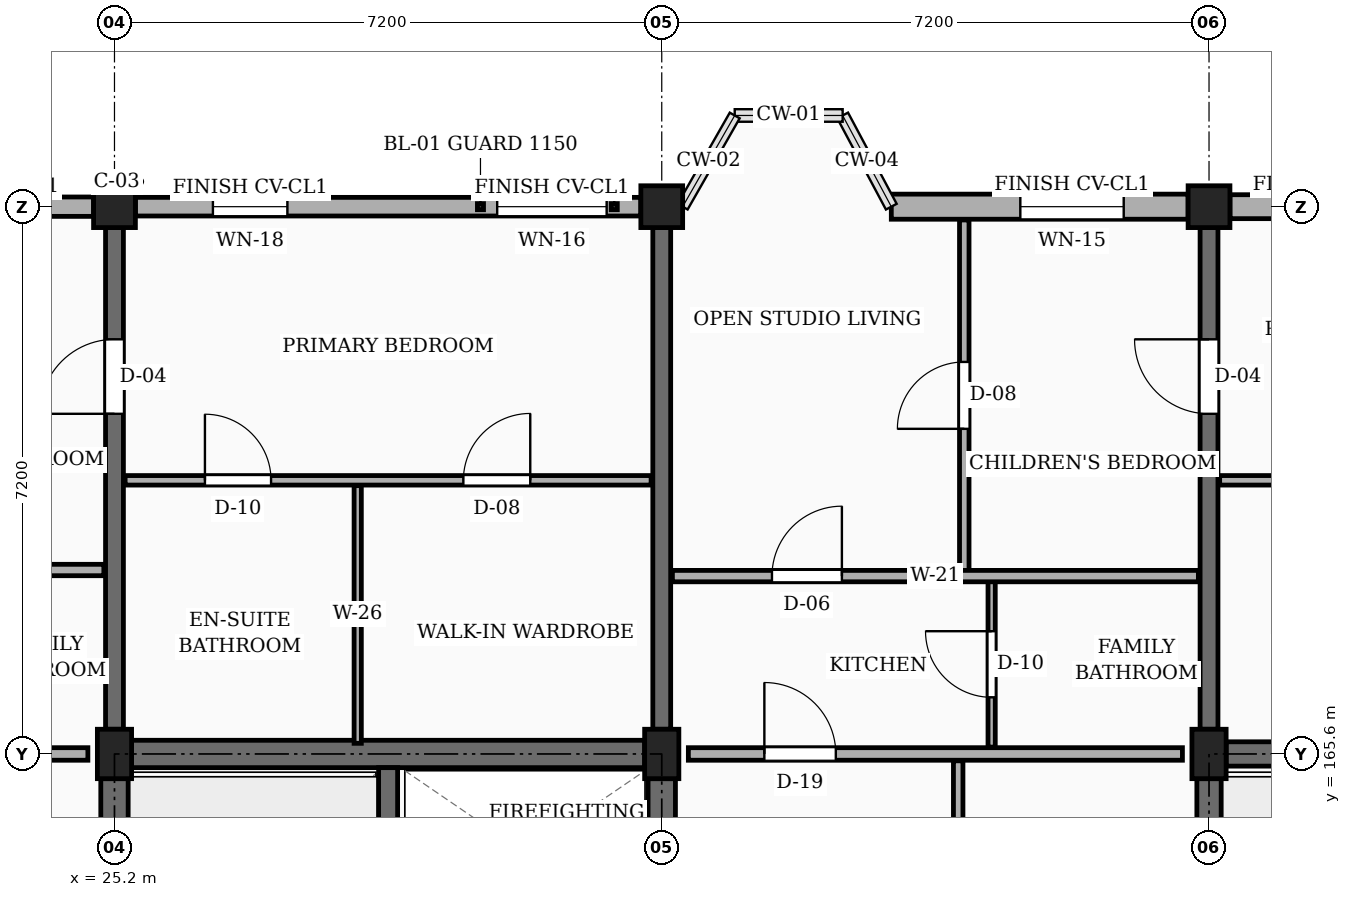
"""IFC4 building model, lengths in metres.
Left out: names, types, materials, properties, quantities, classifications, styles, units other than length and angle.
Written with IfcOpenShell. Run it as: python <this file> out.ifc"""

import sys

from ifc_helpers import new_model, si_unit, direction, frame, frame_2d, origin, origin_2d, place, context, subcontext, project, spatial, rectangle, extrude, element, fill, save


model = new_model("IFC4")
c1 = context("Model", 3, precision=1e-05, world=origin(), true_north=direction((0.0, 1.0)))
c2 = subcontext(c1, "Body", "Model", "MODEL_VIEW")
j1 = project(units=[si_unit("LENGTHUNIT", "METRE"), si_unit("PLANEANGLEUNIT", "RADIAN")], contexts=[c1])
p1 = place(None, origin())
s1 = spatial("IfcSite", under=j1, at=p1, CompositionType="ELEMENT")
p2 = place(p1, origin())
s2 = spatial("IfcBuilding", under=s1, at=p2, CompositionType="ELEMENT")
p3 = place(p2, frame((0.0, 0.0, 13.95)))
s3 = spatial("IfcBuildingStorey", under=s2, at=p3, CompositionType="ELEMENT", Elevation=13.95)
p4 = place(p3, frame((25.2, 165.6, 0.0), z_axis=(0.0, 0.0, 1.0), x_axis=(1.0, 0.0, 0.0)))
e1 = element("IfcColumn", 1, at=p4, inside=s3, PredefinedType="COLUMN", context=c2, shape_type="SweptSolid", body=[
    extrude(rectangle(XDim=0.45, YDim=0.65, at=origin_2d()), origin(), (0.0, 0.0, 1.0), 3.15),
])
p5 = place(p3, frame((25.2, 172.8, 0.0), z_axis=(0.0, 0.0, 1.0), x_axis=(1.0, 0.0, 0.0)))
e2 = element("IfcColumn", 2, at=p5, inside=s3, PredefinedType="COLUMN", context=c2, shape_type="SweptSolid", body=[
    extrude(rectangle(XDim=0.55, YDim=0.55, at=origin_2d()), origin(), (0.0, 0.0, 1.0), 3.15),
])
p6 = place(p3, frame((32.4, 165.6, 0.0), z_axis=(0.0, 0.0, 1.0), x_axis=(1.0, 0.0, 0.0)))
e3 = element("IfcColumn", 3, at=p6, inside=s3, PredefinedType="COLUMN", context=c2, shape_type="SweptSolid", body=[
    extrude(rectangle(XDim=0.45, YDim=0.65, at=origin_2d()), origin(), (0.0, 0.0, 1.0), 3.15),
])
p7 = place(p3, frame((32.4, 172.8, 0.0), z_axis=(0.0, 0.0, 1.0), x_axis=(1.0, 0.0, 0.0)))
e4 = element("IfcColumn", 4, at=p7, inside=s3, PredefinedType="COLUMN", context=c2, shape_type="SweptSolid", body=[
    extrude(rectangle(XDim=0.55, YDim=0.55, at=origin_2d()), origin(), (0.0, 0.0, 1.0), 3.15),
])
p8 = place(p3, frame((39.6, 165.6, 0.0), z_axis=(0.0, 0.0, 1.0), x_axis=(1.0, 0.0, 0.0)))
e5 = element("IfcColumn", 5, at=p8, inside=s3, PredefinedType="COLUMN", context=c2, shape_type="SweptSolid", body=[
    extrude(rectangle(XDim=0.45, YDim=0.65, at=origin_2d()), origin(), (0.0, 0.0, 1.0), 3.15),
])
p9 = place(p3, frame((39.6, 172.8, 0.0), z_axis=(0.0, 0.0, 1.0), x_axis=(1.0, 0.0, 0.0)))
e6 = element("IfcColumn", 6, at=p9, inside=s3, PredefinedType="COLUMN", context=c2, shape_type="SweptSolid", body=[
    extrude(rectangle(XDim=0.55, YDim=0.55, at=origin_2d()), origin(), (0.0, 0.0, 1.0), 3.15),
])
p10 = place(p3, frame((25.2, 165.925, 0.0), z_axis=(0.0, 0.0, 1.0), x_axis=(0.0, 1.0, 0.0)))
e7 = element("IfcWall", 7, at=p10, inside=s3, PredefinedType="SOLIDWALL", context=c2, shape_type="SweptSolid", body=[
    extrude(rectangle(XDim=6.6, YDim=0.235, at=frame_2d((3.3, 0.0))), origin(), (0.0, 0.0, 1.0), 2.185),
])
p11 = place(p10, frame((4.15, 0.0, 0.0)))
e8 = element("IfcOpeningElement", 8, at=p11, cuts=e7, PredefinedType="OPENING", context=c2, shape_type="SweptSolid", body=[
    extrude(rectangle(XDim=0.98, YDim=2.12, at=frame_2d((0.49, 1.06))), frame((0.0, 0.127, 0.0), z_axis=(0.0, -1.0, 0.0), x_axis=(1.0, 0.0, 0.0)), (0.0, 0.0, 1.0), 0.255),
])
p12 = place(p3, frame((32.4, 165.925, 0.0), z_axis=(0.0, 0.0, 1.0), x_axis=(0.0, 1.0, 0.0)))
e9 = element("IfcWall", 9, at=p12, inside=s3, PredefinedType="SOLIDWALL", context=c2, shape_type="SweptSolid", body=[
    extrude(rectangle(XDim=6.6, YDim=0.235, at=frame_2d((3.3, 0.0))), origin(), (0.0, 0.0, 1.0), 2.185),
])
p13 = place(p3, frame((39.6, 165.925, 0.0), z_axis=(0.0, 0.0, 1.0), x_axis=(0.0, 1.0, 0.0)))
e10 = element("IfcWall", 10, at=p13, inside=s3, PredefinedType="SOLIDWALL", context=c2, shape_type="SweptSolid", body=[
    extrude(rectangle(XDim=6.6, YDim=0.235, at=frame_2d((3.3, 0.0))), origin(), (0.0, 0.0, 1.0), 2.185),
])
p14 = place(p13, frame((4.15, 0.0, 0.0)))
e11 = element("IfcOpeningElement", 11, at=p14, cuts=e10, PredefinedType="OPENING", context=c2, shape_type="SweptSolid", body=[
    extrude(rectangle(XDim=0.98, YDim=2.12, at=frame_2d((0.49, 1.06))), frame((0.0, 0.127, 0.0), z_axis=(0.0, -1.0, 0.0), x_axis=(1.0, 0.0, 0.0)), (0.0, 0.0, 1.0), 0.255),
])
p15 = place(p3, frame((46.525, 172.8, 0.0), z_axis=(0.0, 0.0, 1.0), x_axis=(-1.0, 0.0, 0.0)))
e12 = element("IfcWall", 12, at=p15, inside=s3, PredefinedType="SOLIDWALL", context=c2, shape_type="SweptSolid", body=[
    extrude(rectangle(XDim=6.65, YDim=0.315, at=frame_2d((3.325, 0.0))), origin(), (0.0, 0.0, 1.0), 2.455),
])
p16 = place(p15, frame((0.45, 0.0, 0.78)))
e13 = element("IfcOpeningElement", 13, at=p16, cuts=e12, PredefinedType="OPENING", context=c2, shape_type="SweptSolid", body=[
    extrude(rectangle(XDim=1.2, YDim=1.26, at=frame_2d((0.6, 0.63))), frame((0.0, 0.167, 0.0), z_axis=(0.0, -1.0, 0.0), x_axis=(1.0, 0.0, 0.0)), (0.0, 0.0, 1.0), 0.335),
])
p17 = place(p15, frame((4.65, 0.0, 0.78)))
e14 = element("IfcOpeningElement", 14, at=p17, cuts=e12, PredefinedType="OPENING", context=c2, shape_type="SweptSolid", body=[
    extrude(rectangle(XDim=1.36, YDim=1.26, at=frame_2d((0.68, 0.63))), frame((0.0, 0.167, 0.0), z_axis=(0.0, -1.0, 0.0), x_axis=(1.0, 0.0, 0.0)), (0.0, 0.0, 1.0), 0.335),
])
p18 = place(p3, frame((39.325, 172.8, 0.0), z_axis=(0.0, 0.0, 1.0), x_axis=(-1.0, 0.0, 0.0)))
e15 = element("IfcWall", 15, at=p18, inside=s3, PredefinedType="SOLIDWALL", context=c2, shape_type="SweptSolid", body=[
    extrude(rectangle(XDim=3.905, YDim=0.33, at=frame_2d((1.953, 0.0))), origin(), (0.0, 0.0, 1.0), 2.455),
])
p19 = place(p18, frame((0.847, 0.0, 0.78)))
e16 = element("IfcOpeningElement", 16, at=p19, cuts=e15, PredefinedType="OPENING", context=c2, shape_type="SweptSolid", body=[
    extrude(rectangle(XDim=1.36, YDim=1.26, at=frame_2d((0.68, 0.63))), frame((0.0, 0.175, 0.0), z_axis=(0.0, -1.0, 0.0), x_axis=(1.0, 0.0, 0.0)), (0.0, 0.0, 1.0), 0.35),
])
p20 = place(p3, frame((32.125, 172.8, 0.0), z_axis=(0.0, 0.0, 1.0), x_axis=(-1.0, 0.0, 0.0)))
e17 = element("IfcWall", 17, at=p20, inside=s3, PredefinedType="SOLIDWALL", context=c2, shape_type="SweptSolid", body=[
    extrude(rectangle(XDim=6.65, YDim=0.245, at=frame_2d((3.325, 0.0))), origin(), (0.0, 0.0, 1.0), 2.455),
])
p21 = place(p20, frame((0.45, 0.0, 0.78)))
e18 = element("IfcOpeningElement", 18, at=p21, cuts=e17, PredefinedType="OPENING", context=c2, shape_type="SweptSolid", body=[
    extrude(rectangle(XDim=1.44, YDim=1.26, at=frame_2d((0.72, 0.63))), frame((0.0, 0.133, 0.0), z_axis=(0.0, -1.0, 0.0), x_axis=(1.0, 0.0, 0.0)), (0.0, 0.0, 1.0), 0.265),
])
p22 = place(p20, frame((4.65, 0.0, 0.78)))
e19 = element("IfcOpeningElement", 19, at=p22, cuts=e17, PredefinedType="OPENING", context=c2, shape_type="SweptSolid", body=[
    extrude(rectangle(XDim=0.98, YDim=1.36, at=frame_2d((0.49, 0.68))), frame((0.0, 0.133, 0.0), z_axis=(0.0, -1.0, 0.0), x_axis=(1.0, 0.0, 0.0)), (0.0, 0.0, 1.0), 0.265),
])
p23 = place(p3, frame((24.925, 172.8, 0.0), z_axis=(0.0, 0.0, 1.0), x_axis=(-1.0, 0.0, 0.0)))
e20 = element("IfcWall", 20, at=p23, inside=s3, PredefinedType="SOLIDWALL", context=c2, shape_type="SweptSolid", body=[
    extrude(rectangle(XDim=3.905, YDim=0.255, at=frame_2d((1.953, 0.0))), origin(), (0.0, 0.0, 1.0), 2.455),
])
p24 = place(p23, frame((0.988, 0.0, 0.78)))
e21 = element("IfcOpeningElement", 21, at=p24, cuts=e20, PredefinedType="OPENING", context=c2, shape_type="SweptSolid", body=[
    extrude(rectangle(XDim=0.98, YDim=1.36, at=frame_2d((0.49, 0.68))), frame((0.0, 0.137, 0.0), z_axis=(0.0, -1.0, 0.0), x_axis=(1.0, 0.0, 0.0)), (0.0, 0.0, 1.0), 0.275),
])
p25 = place(p3, frame((25.2, 158.725, 0.0), z_axis=(0.0, 0.0, 1.0), x_axis=(0.0, 1.0, 0.0)))
e22 = element("IfcWall", 22, at=p25, inside=s3, PredefinedType="SHEAR", context=c2, shape_type="SweptSolid", body=[
    extrude(rectangle(XDim=6.55, YDim=0.36, at=frame_2d((3.275, 0.0))), origin(), (0.0, 0.0, 1.0), 2.885),
])
p26 = place(p3, frame((25.425, 165.6, 0.0), z_axis=(0.0, 0.0, 1.0), x_axis=(1.0, 0.0, 0.0)))
e23 = element("IfcWall", 23, at=p26, inside=s3, PredefinedType="SHEAR", context=c2, shape_type="SweptSolid", body=[
    extrude(rectangle(XDim=6.75, YDim=0.36, at=frame_2d((3.375, 0.0))), origin(), (0.0, 0.0, 1.0), 2.885),
])
p27 = place(p3, frame((32.4, 158.725, 0.0), z_axis=(0.0, 0.0, 1.0), x_axis=(0.0, 1.0, 0.0)))
e24 = element("IfcWall", 24, at=p27, inside=s3, PredefinedType="SHEAR", context=c2, shape_type="SweptSolid", body=[
    extrude(rectangle(XDim=6.55, YDim=0.36, at=frame_2d((3.275, 0.0))), origin(), (0.0, 0.0, 1.0), 2.885),
])
p28 = place(p3, frame((28.8, 158.58, 0.0), z_axis=(0.0, 0.0, 1.0), x_axis=(0.0, 1.0, 0.0)))
e25 = element("IfcWall", 25, at=p28, inside=s3, PredefinedType="SHEAR", context=c2, shape_type="SweptSolid", body=[
    extrude(rectangle(XDim=6.84, YDim=0.25, at=frame_2d((3.42, 0.0))), origin(), (0.0, 0.0, 1.0), 2.885),
])
p29 = place(p28, frame((0.42, 0.0, 0.0)))
e26 = element("IfcOpeningElement", 26, at=p29, cuts=e25, PredefinedType="OPENING", context=c2, shape_type="SweptSolid", body=[
    extrude(rectangle(XDim=1.05, YDim=2.15, at=frame_2d((0.525, 1.075))), frame((0.0, 0.135, 0.0), z_axis=(0.0, -1.0, 0.0), x_axis=(1.0, 0.0, 0.0)), (0.0, 0.0, 1.0), 0.27),
])
p30 = place(p3, frame((39.6, 158.725, 0.0), z_axis=(0.0, 0.0, 1.0), x_axis=(0.0, 1.0, 0.0)))
e27 = element("IfcWall", 27, at=p30, inside=s3, PredefinedType="SHEAR", context=c2, shape_type="SweptSolid", body=[
    extrude(rectangle(XDim=6.55, YDim=0.32, at=frame_2d((3.275, 0.0))), origin(), (0.0, 0.0, 1.0), 2.885),
])
p31 = place(p3, frame((39.825, 165.6, 0.0), z_axis=(0.0, 0.0, 1.0), x_axis=(1.0, 0.0, 0.0)))
e28 = element("IfcWall", 28, at=p31, inside=s3, PredefinedType="SHEAR", context=c2, shape_type="SweptSolid", body=[
    extrude(rectangle(XDim=6.75, YDim=0.32, at=frame_2d((3.375, 0.0))), origin(), (0.0, 0.0, 1.0), 2.885),
])
p32 = place(p3, frame((18.35, 165.6, 0.0), z_axis=(0.0, 0.0, 1.0), x_axis=(1.0, 0.0, 0.0)))
e29 = element("IfcWall", 29, at=p32, inside=s3, PredefinedType="PARTITIONING", context=c2, shape_type="SweptSolid", body=[
    extrude(rectangle(XDim=6.5, YDim=0.165, at=frame_2d((3.25, 0.0))), origin(), (0.0, 0.0, 1.0), 2.235),
])
p33 = place(p32, frame((1.0, 0.0, 0.0)))
e30 = element("IfcOpeningElement", 30, at=p33, cuts=e29, PredefinedType="OPENING", context=c2, shape_type="SweptSolid", body=[
    extrude(rectangle(XDim=1.0, YDim=2.15, at=frame_2d((0.5, 1.075))), frame((0.0, 0.093, 0.0), z_axis=(0.0, -1.0, 0.0), x_axis=(1.0, 0.0, 0.0)), (0.0, 0.0, 1.0), 0.185),
])
p34 = place(p3, frame((32.75, 165.6, 0.0), z_axis=(0.0, 0.0, 1.0), x_axis=(1.0, 0.0, 0.0)))
e31 = element("IfcWall", 31, at=p34, inside=s3, PredefinedType="PARTITIONING", context=c2, shape_type="SweptSolid", body=[
    extrude(rectangle(XDim=6.5, YDim=0.165, at=frame_2d((3.25, 0.0))), origin(), (0.0, 0.0, 1.0), 2.235),
])
p35 = place(p34, frame((1.0, 0.0, 0.0)))
e32 = element("IfcOpeningElement", 32, at=p35, cuts=e31, PredefinedType="OPENING", context=c2, shape_type="SweptSolid", body=[
    extrude(rectangle(XDim=0.94, YDim=2.12, at=frame_2d((0.47, 1.06))), frame((0.0, 0.093, 0.0), z_axis=(0.0, -1.0, 0.0), x_axis=(1.0, 0.0, 0.0)), (0.0, 0.0, 1.0), 0.185),
])
p36 = place(p3, frame((18.14, 168.02, 0.0), z_axis=(0.0, 0.0, 1.0), x_axis=(1.0, 0.0, 0.0)))
e33 = element("IfcWall", 33, at=p36, inside=s3, PredefinedType="PARTITIONING", context=c2, shape_type="SweptSolid", body=[
    extrude(rectangle(XDim=6.92, YDim=0.15, at=frame_2d((3.46, 0.0))), origin(), (0.0, 0.0, 1.0), 2.32),
])
p37 = place(p36, frame((1.31, 0.0, 0.0)))
e34 = element("IfcOpeningElement", 34, at=p37, cuts=e33, PredefinedType="OPENING", context=c2, shape_type="SweptSolid", body=[
    extrude(rectangle(XDim=0.92, YDim=2.1, at=frame_2d((0.46, 1.05))), frame((0.0, 0.085, 0.0), z_axis=(0.0, -1.0, 0.0), x_axis=(1.0, 0.0, 0.0)), (0.0, 0.0, 1.0), 0.17),
])
p38 = place(p3, frame((25.34, 169.2, 0.0), z_axis=(0.0, 0.0, 1.0), x_axis=(1.0, 0.0, 0.0)))
e35 = element("IfcWall", 35, at=p38, inside=s3, PredefinedType="PARTITIONING", context=c2, shape_type="SweptSolid", body=[
    extrude(rectangle(XDim=6.92, YDim=0.125, at=frame_2d((3.46, 0.0))), origin(), (0.0, 0.0, 1.0), 2.32),
])
p39 = place(p38, frame((1.05, 0.0, 0.0)))
e36 = element("IfcOpeningElement", 36, at=p39, cuts=e35, PredefinedType="OPENING", context=c2, shape_type="SweptSolid", body=[
    extrude(rectangle(XDim=0.87, YDim=2.05, at=frame_2d((0.435, 1.025))), frame((0.0, 0.073, 0.0), z_axis=(0.0, -1.0, 0.0), x_axis=(1.0, 0.0, 0.0)), (0.0, 0.0, 1.0), 0.145),
])
p40 = place(p38, frame((4.45, 0.0, 0.0)))
e37 = element("IfcOpeningElement", 37, at=p40, cuts=e35, PredefinedType="OPENING", context=c2, shape_type="SweptSolid", body=[
    extrude(rectangle(XDim=0.88, YDim=2.08, at=frame_2d((0.44, 1.04))), frame((0.0, 0.073, 0.0), z_axis=(0.0, -1.0, 0.0), x_axis=(1.0, 0.0, 0.0)), (0.0, 0.0, 1.0), 0.145),
])
p41 = place(p3, frame((28.4, 165.74, 0.0), z_axis=(0.0, 0.0, 1.0), x_axis=(0.0, 1.0, 0.0)))
e38 = element("IfcWall", 38, at=p41, inside=s3, PredefinedType="PARTITIONING", context=c2, shape_type="SweptSolid", body=[
    extrude(rectangle(XDim=3.39, YDim=0.095, at=frame_2d((1.695, 0.0))), origin(), (0.0, 0.0, 1.0), 2.32),
])
p42 = place(p3, frame((36.3, 158.49, 0.0), z_axis=(0.0, 0.0, 1.0), x_axis=(0.0, 1.0, 0.0)))
e39 = element("IfcWall", 39, at=p42, inside=s3, PredefinedType="PARTITIONING", context=c2, shape_type="SweptSolid", body=[
    extrude(rectangle(XDim=7.02, YDim=0.125, at=frame_2d((3.51, 0.0))), origin(), (0.0, 0.0, 1.0), 2.32),
])
p43 = place(p42, frame((2.85, 0.0, 0.0)))
e40 = element("IfcOpeningElement", 40, at=p43, cuts=e39, PredefinedType="OPENING", context=c2, shape_type="SweptSolid", body=[
    extrude(rectangle(XDim=1.02, YDim=2.15, at=frame_2d((0.51, 1.075))), frame((0.0, 0.073, 0.0), z_axis=(0.0, -1.0, 0.0), x_axis=(1.0, 0.0, 0.0)), (0.0, 0.0, 1.0), 0.145),
])
p44 = place(p3, frame((36.38, 168.01, 0.0), z_axis=(0.0, 0.0, 1.0), x_axis=(0.0, 1.0, 0.0)))
e41 = element("IfcWall", 41, at=p44, inside=s3, PredefinedType="PARTITIONING", context=c2, shape_type="SweptSolid", body=[
    extrude(rectangle(XDim=4.615, YDim=0.125, at=frame_2d((2.308, 0.0))), origin(), (0.0, 0.0, 1.0), 2.32),
])
p45 = place(p44, frame((1.867, 0.0, 0.0)))
e42 = element("IfcOpeningElement", 42, at=p45, cuts=e41, PredefinedType="OPENING", context=c2, shape_type="SweptSolid", body=[
    extrude(rectangle(XDim=0.88, YDim=2.08, at=frame_2d((0.44, 1.04))), frame((0.0, 0.073, 0.0), z_axis=(0.0, -1.0, 0.0), x_axis=(1.0, 0.0, 0.0)), (0.0, 0.0, 1.0), 0.145),
])
p46 = place(p3, frame((36.74, 165.69, 0.0), z_axis=(0.0, 0.0, 1.0), x_axis=(0.0, 1.0, 0.0)))
e43 = element("IfcWall", 43, at=p46, inside=s3, PredefinedType="PARTITIONING", context=c2, shape_type="SweptSolid", body=[
    extrude(rectangle(XDim=2.18, YDim=0.095, at=frame_2d((1.09, 0.0))), origin(), (0.0, 0.0, 1.0), 2.32),
])
p47 = place(p46, frame((0.655, 0.0, 0.0)))
e44 = element("IfcOpeningElement", 44, at=p47, cuts=e43, PredefinedType="OPENING", context=c2, shape_type="SweptSolid", body=[
    extrude(rectangle(XDim=0.87, YDim=2.05, at=frame_2d((0.435, 1.025))), frame((0.0, 0.058, 0.0), z_axis=(0.0, -1.0, 0.0), x_axis=(1.0, 0.0, 0.0)), (0.0, 0.0, 1.0), 0.115),
])
p48 = place(p3, frame((32.54, 167.94, 0.0), z_axis=(0.0, 0.0, 1.0), x_axis=(1.0, 0.0, 0.0)))
e45 = element("IfcWall", 45, at=p48, inside=s3, PredefinedType="PARTITIONING", context=c2, shape_type="SweptSolid", body=[
    extrude(rectangle(XDim=6.92, YDim=0.15, at=frame_2d((3.46, 0.0))), origin(), (0.0, 0.0, 1.0), 2.32),
])
p49 = place(p48, frame((1.31, 0.0, 0.0)))
e46 = element("IfcOpeningElement", 46, at=p49, cuts=e45, PredefinedType="OPENING", context=c2, shape_type="SweptSolid", body=[
    extrude(rectangle(XDim=0.92, YDim=2.1, at=frame_2d((0.46, 1.05))), frame((0.0, 0.085, 0.0), z_axis=(0.0, -1.0, 0.0), x_axis=(1.0, 0.0, 0.0)), (0.0, 0.0, 1.0), 0.17),
])
p50 = place(p3, frame((39.74, 169.2, 0.0), z_axis=(0.0, 0.0, 1.0), x_axis=(1.0, 0.0, 0.0)))
e47 = element("IfcWall", 47, at=p50, inside=s3, PredefinedType="PARTITIONING", context=c2, shape_type="SweptSolid", body=[
    extrude(rectangle(XDim=6.92, YDim=0.125, at=frame_2d((3.46, 0.0))), origin(), (0.0, 0.0, 1.0), 2.32),
])
p51 = place(p50, frame((1.05, 0.0, 0.0)))
e48 = element("IfcOpeningElement", 48, at=p51, cuts=e47, PredefinedType="OPENING", context=c2, shape_type="SweptSolid", body=[
    extrude(rectangle(XDim=0.87, YDim=2.05, at=frame_2d((0.435, 1.025))), frame((0.0, 0.073, 0.0), z_axis=(0.0, -1.0, 0.0), x_axis=(1.0, 0.0, 0.0)), (0.0, 0.0, 1.0), 0.145),
])
p52 = place(p50, frame((4.45, 0.0, 0.0)))
e49 = element("IfcOpeningElement", 49, at=p52, cuts=e47, PredefinedType="OPENING", context=c2, shape_type="SweptSolid", body=[
    extrude(rectangle(XDim=0.88, YDim=2.08, at=frame_2d((0.44, 1.04))), frame((0.0, 0.073, 0.0), z_axis=(0.0, -1.0, 0.0), x_axis=(1.0, 0.0, 0.0)), (0.0, 0.0, 1.0), 0.145),
])
p53 = place(p19, origin())
e50 = element("IfcWindow", 50, at=p53, inside=s3, PartitioningType="SINGLE_PANEL", PredefinedType="WINDOW", context=c2, shape_type="SweptSolid", body=[
    extrude(rectangle(XDim=1.36, YDim=1.26, at=frame_2d((0.68, 0.63))), frame((0.0, 0.03, 0.0), z_axis=(0.0, -1.0, 0.0), x_axis=(1.0, 0.0, 0.0)), (0.0, 0.0, 1.0), 0.06),
])
fill(e16, e50)
p54 = place(p21, origin())
e51 = element("IfcWindow", 51, at=p54, inside=s3, PartitioningType="SINGLE_PANEL", PredefinedType="WINDOW", context=c2, shape_type="SweptSolid", body=[
    extrude(rectangle(XDim=1.44, YDim=1.26, at=frame_2d((0.72, 0.63))), frame((0.0, 0.03, 0.0), z_axis=(0.0, -1.0, 0.0), x_axis=(1.0, 0.0, 0.0)), (0.0, 0.0, 1.0), 0.06),
])
fill(e18, e51)
p55 = place(p22, origin())
e52 = element("IfcWindow", 52, at=p55, inside=s3, PartitioningType="SINGLE_PANEL", PredefinedType="WINDOW", context=c2, shape_type="SweptSolid", body=[
    extrude(rectangle(XDim=0.98, YDim=1.36, at=frame_2d((0.49, 0.68))), frame((0.0, 0.03, 0.0), z_axis=(0.0, -1.0, 0.0), x_axis=(1.0, 0.0, 0.0)), (0.0, 0.0, 1.0), 0.06),
])
fill(e19, e52)
p56 = place(p35, origin())
e53 = element("IfcDoor", 53, at=p56, inside=s3, OperationType="SINGLE_SWING_LEFT", PredefinedType="DOOR", context=c2, shape_type="SweptSolid", body=[
    extrude(rectangle(XDim=0.94, YDim=2.12, at=frame_2d((0.47, 1.06))), frame((0.0, 0.025, 0.0), z_axis=(0.0, -1.0, 0.0), x_axis=(1.0, 0.0, 0.0)), (0.0, 0.0, 1.0), 0.05),
])
fill(e32, e53)
p57 = place(p39, origin())
e54 = element("IfcDoor", 54, at=p57, inside=s3, OperationType="SINGLE_SWING_LEFT", PredefinedType="DOOR", context=c2, shape_type="SweptSolid", body=[
    extrude(rectangle(XDim=0.87, YDim=2.05, at=frame_2d((0.435, 1.025))), frame((0.0, 0.025, 0.0), z_axis=(0.0, -1.0, 0.0), x_axis=(1.0, 0.0, 0.0)), (0.0, 0.0, 1.0), 0.05),
])
fill(e36, e54)
p58 = place(p40, origin())
e55 = element("IfcDoor", 55, at=p58, inside=s3, OperationType="SINGLE_SWING_RIGHT", PredefinedType="DOOR", context=c2, shape_type="SweptSolid", body=[
    extrude(rectangle(XDim=0.88, YDim=2.08, at=frame_2d((0.44, 1.04))), frame((0.0, 0.025, 0.0), z_axis=(0.0, -1.0, 0.0), x_axis=(1.0, 0.0, 0.0)), (0.0, 0.0, 1.0), 0.05),
])
fill(e37, e55)
p59 = place(p45, origin())
e56 = element("IfcDoor", 56, at=p59, inside=s3, OperationType="SINGLE_SWING_LEFT", PredefinedType="DOOR", context=c2, shape_type="SweptSolid", body=[
    extrude(rectangle(XDim=0.88, YDim=2.08, at=frame_2d((0.44, 1.04))), frame((0.0, 0.025, 0.0), z_axis=(0.0, -1.0, 0.0), x_axis=(1.0, 0.0, 0.0)), (0.0, 0.0, 1.0), 0.05),
])
fill(e42, e56)
p60 = place(p47, origin())
e57 = element("IfcDoor", 57, at=p60, inside=s3, OperationType="SINGLE_SWING_RIGHT", PredefinedType="DOOR", context=c2, shape_type="SweptSolid", body=[
    extrude(rectangle(XDim=0.87, YDim=2.05, at=frame_2d((0.435, 1.025))), frame((0.0, 0.025, 0.0), z_axis=(0.0, -1.0, 0.0), x_axis=(1.0, 0.0, 0.0)), (0.0, 0.0, 1.0), 0.05),
])
fill(e44, e57)
p61 = place(p49, origin())
e58 = element("IfcDoor", 58, at=p61, inside=s3, OperationType="SINGLE_SWING_RIGHT", PredefinedType="DOOR", context=c2, shape_type="SweptSolid", body=[
    extrude(rectangle(XDim=0.92, YDim=2.1, at=frame_2d((0.46, 1.05))), frame((0.0, 0.025, 0.0), z_axis=(0.0, -1.0, 0.0), x_axis=(1.0, 0.0, 0.0)), (0.0, 0.0, 1.0), 0.05),
])
fill(e46, e58)
p62 = place(p11, origin())
e59 = element("IfcDoor", 59, at=p62, inside=s3, OperationType="SINGLE_SWING_LEFT", PredefinedType="DOOR", context=c2, shape_type="SweptSolid", body=[
    extrude(rectangle(XDim=0.98, YDim=2.12, at=frame_2d((0.49, 1.06))), frame((0.0, 0.025, 0.0), z_axis=(0.0, -1.0, 0.0), x_axis=(1.0, 0.0, 0.0)), (0.0, 0.0, 1.0), 0.05),
])
fill(e8, e59)
p63 = place(p14, origin())
e60 = element("IfcDoor", 60, at=p63, inside=s3, OperationType="SINGLE_SWING_RIGHT", PredefinedType="DOOR", context=c2, shape_type="SweptSolid", body=[
    extrude(rectangle(XDim=0.98, YDim=2.12, at=frame_2d((0.49, 1.06))), frame((0.0, 0.025, 0.0), z_axis=(0.0, -1.0, 0.0), x_axis=(1.0, 0.0, 0.0)), (0.0, 0.0, 1.0), 0.05),
])
fill(e11, e60)
save(model, sys.argv[1])
